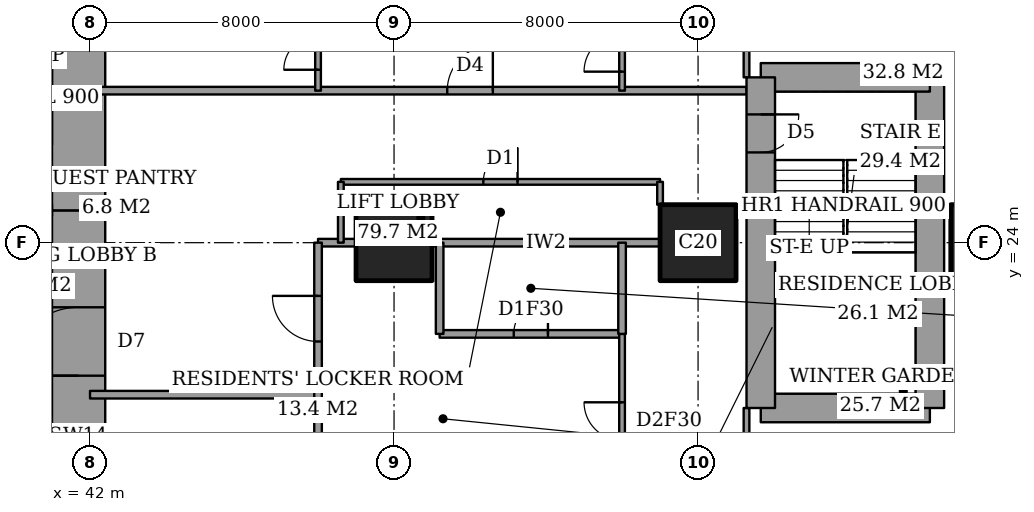
"""IFC4 building model, lengths in metres.
Left out: names, types, materials, properties, quantities, classifications, styles, units other than length and angle.
Written with IfcOpenShell. Run it as: python <this file> out.ifc"""

import sys

from ifc_helpers import new_model, si_unit, direction, frame, frame_2d, origin, origin_2d, place, context, subcontext, project, spatial, rectangle, extrude, element, fill, save


model = new_model("IFC4")
c1 = context("Model", 3, precision=1e-05, world=origin(), true_north=direction((0.0, 1.0)))
c2 = subcontext(c1, "Body", "Model", "MODEL_VIEW")
j1 = project(units=[si_unit("LENGTHUNIT", "METRE"), si_unit("PLANEANGLEUNIT", "RADIAN")], contexts=[c1])
p1 = place(None, origin())
s1 = spatial("IfcSite", under=j1, at=p1, CompositionType="ELEMENT")
p2 = place(p1, origin())
s2 = spatial("IfcBuilding", under=s1, at=p2, CompositionType="ELEMENT")
p3 = place(p2, frame((0.0, 0.0, 80.0)))
s3 = spatial("IfcBuildingStorey", under=s2, at=p3, CompositionType="ELEMENT", Elevation=80.0)
for number, where, z_axis, x_axis in (
    (1, (50.0, 24.0, 0.0), (0.0, 0.0, 1.0), (1.0, 0.0, 0.0)),
    (2, (58.0, 24.0, 0.0), (0.0, 0.0, 1.0), (1.0, 0.0, 0.0)),
    (3, (65.65, 24.0, 0.0), (0.0, 0.0, 1.0), (1.0, 0.0, 0.0)),
):
    element("IfcColumn", number, at=place(p3, frame(where, z_axis=z_axis, x_axis=x_axis)), inside=s3, PredefinedType="COLUMN", context=c2, shape_type="SweptSolid", body=[
        extrude(rectangle(XDim=2.0, YDim=2.0, at=origin_2d()), origin(), (0.0, 0.0, 1.0), 3.6),
    ])
p4 = place(p3, frame((41.7, 13.0, 0.0), z_axis=(0.0, 0.0, 1.0), x_axis=(0.0, 1.0, 0.0)))
e4 = element("IfcWall", 4, at=p4, inside=s3, PredefinedType="SHEAR", context=c2, shape_type="SweptSolid", body=[
    extrude(rectangle(XDim=11.85, YDim=1.4, at=frame_2d((5.925, 0.0))), origin(), (0.0, 0.0, 1.0), 3.6),
])
p5 = place(p4, frame((7.5, 0.0, 0.0)))
e5 = element("IfcOpeningElement", 5, at=p5, cuts=e4, PredefinedType="OPENING", context=c2, shape_type="SweptSolid", body=[
    extrude(rectangle(XDim=1.8, YDim=2.4, at=frame_2d((0.9, 1.2))), frame((0.0, 0.71, 0.0), z_axis=(0.0, -1.0, 0.0), x_axis=(1.0, 0.0, 0.0)), (0.0, 0.0, 1.0), 1.42),
])
p6 = place(p3, frame((41.7, 24.85, 0.0), z_axis=(0.0, 0.0, 1.0), x_axis=(0.0, 1.0, 0.0)))
e6 = element("IfcWall", 6, at=p6, inside=s3, PredefinedType="SHEAR", context=c2, shape_type="SweptSolid", body=[
    extrude(rectangle(XDim=10.15, YDim=1.4, at=frame_2d((5.075, 0.0))), origin(), (0.0, 0.0, 1.0), 3.6),
])
p7 = place(p3, frame((59.65, 19.65, 0.0), z_axis=(0.0, 0.0, 1.0), x_axis=(1.0, 0.0, 0.0)))
e7 = element("IfcWall", 7, at=p7, inside=s3, PredefinedType="SHEAR", context=c2, shape_type="SweptSolid", body=[
    extrude(rectangle(XDim=4.45, YDim=0.75, at=frame_2d((2.225, 0.0))), origin(), (0.0, 0.0, 1.0), 3.6),
])
p8 = place(p3, frame((64.1, 19.65, 0.0), z_axis=(0.0, 0.0, 1.0), x_axis=(0.0, 1.0, 0.0)))
e8 = element("IfcWall", 8, at=p8, inside=s3, PredefinedType="SHEAR", context=c2, shape_type="SweptSolid", body=[
    extrude(rectangle(XDim=8.7, YDim=0.75, at=frame_2d((4.35, 0.0))), origin(), (0.0, 0.0, 1.0), 3.6),
])
p9 = place(p3, frame((64.1, 28.35, 0.0), z_axis=(0.0, 0.0, 1.0), x_axis=(-1.0, 0.0, 0.0)))
e9 = element("IfcWall", 9, at=p9, inside=s3, PredefinedType="SHEAR", context=c2, shape_type="SweptSolid", body=[
    extrude(rectangle(XDim=4.45, YDim=0.75, at=frame_2d((2.225, 0.0))), origin(), (0.0, 0.0, 1.0), 3.6),
])
p10 = place(p3, frame((59.65, 28.35, 0.0), z_axis=(0.0, 0.0, 1.0), x_axis=(0.0, -1.0, 0.0)))
e10 = element("IfcWall", 10, at=p10, inside=s3, PredefinedType="SHEAR", context=c2, shape_type="SweptSolid", body=[
    extrude(rectangle(XDim=8.7, YDim=0.75, at=frame_2d((4.35, 0.0))), origin(), (0.0, 0.0, 1.0), 3.6),
])
p11 = place(p10, frame((0.975, 0.0, 0.0)))
e11 = element("IfcOpeningElement", 11, at=p11, cuts=e10, PredefinedType="OPENING", context=c2, shape_type="SweptSolid", body=[
    extrude(rectangle(XDim=1.0, YDim=2.1, at=frame_2d((0.5, 1.05))), frame((0.0, 0.385, 0.0), z_axis=(0.0, -1.0, 0.0), x_axis=(1.0, 0.0, 0.0)), (0.0, 0.0, 1.0), 0.77),
])
p12 = place(p3, frame((42.0, 20.0, 0.0), z_axis=(0.0, 0.0, 1.0), x_axis=(1.0, 0.0, 0.0)))
e12 = element("IfcWall", 12, at=p12, inside=s3, PredefinedType="PARTITIONING", context=c2, shape_type="SweptSolid", body=[
    extrude(rectangle(XDim=6.0, YDim=0.2, at=frame_2d((3.0, 0.0))), origin(), (0.0, 0.0, 1.0), 3.35),
])
p13 = place(p3, frame((51.2, 21.6, 0.0), z_axis=(0.0, 0.0, 1.0), x_axis=(1.0, 0.0, 0.0)))
e13 = element("IfcWall", 13, at=p13, inside=s3, PredefinedType="PARTITIONING", context=c2, shape_type="SweptSolid", body=[
    extrude(rectangle(XDim=4.8, YDim=0.2, at=frame_2d((2.4, 0.0))), origin(), (0.0, 0.0, 1.0), 3.35),
])
p14 = place(p13, frame((1.95, 0.0, 0.0)))
e14 = element("IfcOpeningElement", 14, at=p14, cuts=e13, PredefinedType="OPENING", context=c2, shape_type="SweptSolid", body=[
    extrude(rectangle(XDim=0.9, YDim=2.1, at=frame_2d((0.45, 1.05))), frame((0.0, 0.11, 0.0), z_axis=(0.0, -1.0, 0.0), x_axis=(1.0, 0.0, 0.0)), (0.0, 0.0, 1.0), 0.22),
])
p15 = place(p3, frame((48.0, 24.0, 0.0), z_axis=(0.0, 0.0, 1.0), x_axis=(1.0, 0.0, 0.0)))
e15 = element("IfcWall", 15, at=p15, inside=s3, PredefinedType="PARTITIONING", context=c2, shape_type="SweptSolid", body=[
    extrude(rectangle(XDim=1.0, YDim=0.2, at=frame_2d((0.5, 0.0))), origin(), (0.0, 0.0, 1.0), 3.35),
])
p16 = place(p3, frame((51.0, 24.0, 0.0), z_axis=(0.0, 0.0, 1.0), x_axis=(1.0, 0.0, 0.0)))
e16 = element("IfcWall", 16, at=p16, inside=s3, PredefinedType="PARTITIONING", context=c2, shape_type="SweptSolid", body=[
    extrude(rectangle(XDim=6.0, YDim=0.2, at=frame_2d((3.0, 0.0))), origin(), (0.0, 0.0, 1.0), 3.35),
])
p17 = place(p3, frame((48.6, 25.6, 0.0), z_axis=(0.0, 0.0, 1.0), x_axis=(1.0, 0.0, 0.0)))
e17 = element("IfcWall", 17, at=p17, inside=s3, PredefinedType="PARTITIONING", context=c2, shape_type="SweptSolid", body=[
    extrude(rectangle(XDim=8.4, YDim=0.15, at=frame_2d((4.2, 0.0))), origin(), (0.0, 0.0, 1.0), 3.35),
])
p18 = place(p17, frame((3.75, 0.0, 0.0)))
e18 = element("IfcOpeningElement", 18, at=p18, cuts=e17, PredefinedType="OPENING", context=c2, shape_type="SweptSolid", body=[
    extrude(rectangle(XDim=0.9, YDim=2.1, at=frame_2d((0.45, 1.05))), frame((0.0, 0.085, 0.0), z_axis=(0.0, -1.0, 0.0), x_axis=(1.0, 0.0, 0.0)), (0.0, 0.0, 1.0), 0.17),
])
p19 = place(p3, frame((42.0, 28.0, 0.0), z_axis=(0.0, 0.0, 1.0), x_axis=(1.0, 0.0, 0.0)))
e19 = element("IfcWall", 19, at=p19, inside=s3, PredefinedType="PARTITIONING", context=c2, shape_type="SweptSolid", body=[
    extrude(rectangle(XDim=17.275, YDim=0.2, at=frame_2d((8.637, 0.0))), origin(), (0.0, 0.0, 1.0), 3.35),
])
p20 = place(p19, frame((9.4, 0.0, 0.0)))
e20 = element("IfcOpeningElement", 20, at=p20, cuts=e19, PredefinedType="OPENING", context=c2, shape_type="SweptSolid", body=[
    extrude(rectangle(XDim=1.2, YDim=2.4, at=frame_2d((0.6, 1.2))), frame((0.0, 0.11, 0.0), z_axis=(0.0, -1.0, 0.0), x_axis=(1.0, 0.0, 0.0)), (0.0, 0.0, 1.0), 0.22),
])
p21 = place(p3, frame((48.0, 17.0, 0.0), z_axis=(0.0, 0.0, 1.0), x_axis=(0.0, 1.0, 0.0)))
e21 = element("IfcWall", 21, at=p21, inside=s3, PredefinedType="PARTITIONING", context=c2, shape_type="SweptSolid", body=[
    extrude(rectangle(XDim=7.0, YDim=0.2, at=frame_2d((3.5, 0.0))), origin(), (0.0, 0.0, 1.0), 3.35),
])
p22 = place(p21, frame((4.4, 0.0, 0.0)))
e22 = element("IfcOpeningElement", 22, at=p22, cuts=e21, PredefinedType="OPENING", context=c2, shape_type="SweptSolid", body=[
    extrude(rectangle(XDim=1.2, YDim=2.4, at=frame_2d((0.6, 1.2))), frame((0.0, 0.11, 0.0), z_axis=(0.0, -1.0, 0.0), x_axis=(1.0, 0.0, 0.0)), (0.0, 0.0, 1.0), 0.22),
])
p23 = place(p21, frame((1.05, 0.0, 0.0)))
e23 = element("IfcOpeningElement", 23, at=p23, cuts=e21, PredefinedType="OPENING", context=c2, shape_type="SweptSolid", body=[
    extrude(rectangle(XDim=0.9, YDim=2.1, at=frame_2d((0.45, 1.05))), frame((0.0, 0.11, 0.0), z_axis=(0.0, -1.0, 0.0), x_axis=(1.0, 0.0, 0.0)), (0.0, 0.0, 1.0), 0.22),
])
p24 = place(p3, frame((48.0, 28.0, 0.0), z_axis=(0.0, 0.0, 1.0), x_axis=(0.0, 1.0, 0.0)))
e24 = element("IfcWall", 24, at=p24, inside=s3, PredefinedType="PARTITIONING", context=c2, shape_type="SweptSolid", body=[
    extrude(rectangle(XDim=9.4, YDim=0.15, at=frame_2d((4.7, 0.0))), origin(), (0.0, 0.0, 1.0), 3.35),
])
p25 = place(p24, frame((0.55, 0.0, 0.0)))
e25 = element("IfcOpeningElement", 25, at=p25, cuts=e24, PredefinedType="OPENING", context=c2, shape_type="SweptSolid", body=[
    extrude(rectangle(XDim=0.9, YDim=2.1, at=frame_2d((0.45, 1.05))), frame((0.0, 0.085, 0.0), z_axis=(0.0, -1.0, 0.0), x_axis=(1.0, 0.0, 0.0)), (0.0, 0.0, 1.0), 0.17),
])
p26 = place(p3, frame((48.6, 24.0, 0.0), z_axis=(0.0, 0.0, 1.0), x_axis=(0.0, 1.0, 0.0)))
e26 = element("IfcWall", 26, at=p26, inside=s3, PredefinedType="PARTITIONING", context=c2, shape_type="SweptSolid", body=[
    extrude(rectangle(XDim=1.6, YDim=0.15, at=frame_2d((0.8, 0.0))), origin(), (0.0, 0.0, 1.0), 3.35),
])
for number, where, z_axis, x_axis in (
    (27, (51.2, 21.6, 0.0), (0.0, 0.0, 1.0), (0.0, 1.0, 0.0)),
    (28, (56.0, 21.6, 0.0), (0.0, 0.0, 1.0), (0.0, 1.0, 0.0)),
):
    element("IfcWall", number, at=place(p3, frame(where, z_axis=z_axis, x_axis=x_axis)), inside=s3, PredefinedType="PARTITIONING", context=c2, shape_type="SweptSolid", body=[
        extrude(rectangle(XDim=2.4, YDim=0.2, at=frame_2d((1.2, 0.0))), origin(), (0.0, 0.0, 1.0), 3.35),
    ])
p27 = place(p3, frame((56.0, 10.6, 0.0), z_axis=(0.0, 0.0, 1.0), x_axis=(0.0, 1.0, 0.0)))
e29 = element("IfcWall", 29, at=p27, inside=s3, PredefinedType="PARTITIONING", context=c2, shape_type="SweptSolid", body=[
    extrude(rectangle(XDim=11.0, YDim=0.15, at=frame_2d((5.5, 0.0))), origin(), (0.0, 0.0, 1.0), 3.35),
])
p28 = place(p27, frame((8.2, 0.0, 0.0)))
e30 = element("IfcOpeningElement", 30, at=p28, cuts=e29, PredefinedType="OPENING", context=c2, shape_type="SweptSolid", body=[
    extrude(rectangle(XDim=1.0, YDim=2.1, at=frame_2d((0.5, 1.05))), frame((0.0, 0.085, 0.0), z_axis=(0.0, -1.0, 0.0), x_axis=(1.0, 0.0, 0.0)), (0.0, 0.0, 1.0), 0.17),
])
p29 = place(p3, frame((56.0, 28.0, 0.0), z_axis=(0.0, 0.0, 1.0), x_axis=(0.0, 1.0, 0.0)))
e31 = element("IfcWall", 31, at=p29, inside=s3, PredefinedType="PARTITIONING", context=c2, shape_type="SweptSolid", body=[
    extrude(rectangle(XDim=9.4, YDim=0.15, at=frame_2d((4.7, 0.0))), origin(), (0.0, 0.0, 1.0), 3.35),
])
p30 = place(p29, frame((0.5, 0.0, 0.0)))
e32 = element("IfcOpeningElement", 32, at=p30, cuts=e31, PredefinedType="OPENING", context=c2, shape_type="SweptSolid", body=[
    extrude(rectangle(XDim=1.0, YDim=2.1, at=frame_2d((0.5, 1.05))), frame((0.0, 0.085, 0.0), z_axis=(0.0, -1.0, 0.0), x_axis=(1.0, 0.0, 0.0)), (0.0, 0.0, 1.0), 0.17),
])
p31 = place(p3, frame((57.0, 25.0, 0.0), z_axis=(0.0, 0.0, 1.0), x_axis=(0.0, 1.0, 0.0)))
e33 = element("IfcWall", 33, at=p31, inside=s3, PredefinedType="PARTITIONING", context=c2, shape_type="SweptSolid", body=[
    extrude(rectangle(XDim=0.6, YDim=0.15, at=frame_2d((0.3, 0.0))), origin(), (0.0, 0.0, 1.0), 3.35),
])
p32 = place(p3, frame((59.275, 17.2, 0.0), z_axis=(0.0, 0.0, 1.0), x_axis=(0.0, 1.0, 0.0)))
e34 = element("IfcWall", 34, at=p32, inside=s3, PredefinedType="PARTITIONING", context=c2, shape_type="SweptSolid", body=[
    extrude(rectangle(XDim=2.45, YDim=0.15, at=frame_2d((1.225, 0.0))), origin(), (0.0, 0.0, 1.0), 3.35),
])
p33 = place(p32, frame((0.538, 0.0, 0.0)))
e35 = element("IfcOpeningElement", 35, at=p33, cuts=e34, PredefinedType="OPENING", context=c2, shape_type="SweptSolid", body=[
    extrude(rectangle(XDim=1.0, YDim=2.1, at=frame_2d((0.5, 1.05))), frame((0.0, 0.085, 0.0), z_axis=(0.0, -1.0, 0.0), x_axis=(1.0, 0.0, 0.0)), (0.0, 0.0, 1.0), 0.17),
])
p34 = place(p3, frame((59.275, 28.35, 0.0), z_axis=(0.0, 0.0, 1.0), x_axis=(0.0, 1.0, 0.0)))
e36 = element("IfcWall", 36, at=p34, inside=s3, PredefinedType="PARTITIONING", context=c2, shape_type="SweptSolid", body=[
    extrude(rectangle(XDim=2.45, YDim=0.15, at=frame_2d((1.225, 0.0))), origin(), (0.0, 0.0, 1.0), 3.35),
])
p35 = place(p34, frame((0.913, 0.0, 0.0)))
e37 = element("IfcOpeningElement", 37, at=p35, cuts=e36, PredefinedType="OPENING", context=c2, shape_type="SweptSolid", body=[
    extrude(rectangle(XDim=1.0, YDim=2.1, at=frame_2d((0.5, 1.05))), frame((0.0, 0.085, 0.0), z_axis=(0.0, -1.0, 0.0), x_axis=(1.0, 0.0, 0.0)), (0.0, 0.0, 1.0), 0.17),
])
p36 = place(p28, origin())
e38 = element("IfcDoor", 38, at=p36, inside=s3, OperationType="SINGLE_SWING_LEFT", PredefinedType="DOOR", context=c2, shape_type="SweptSolid", body=[
    extrude(rectangle(XDim=1.0, YDim=2.1, at=frame_2d((0.5, 1.05))), frame((0.0, 0.025, 0.0), z_axis=(0.0, -1.0, 0.0), x_axis=(1.0, 0.0, 0.0)), (0.0, 0.0, 1.0), 0.05),
])
fill(e30, e38)
p37 = place(p14, origin())
e39 = element("IfcDoor", 39, at=p37, inside=s3, OperationType="SINGLE_SWING_LEFT", PredefinedType="DOOR", context=c2, shape_type="SweptSolid", body=[
    extrude(rectangle(XDim=0.9, YDim=2.1, at=frame_2d((0.45, 1.05))), frame((0.0, 0.025, 0.0), z_axis=(0.0, -1.0, 0.0), x_axis=(1.0, 0.0, 0.0)), (0.0, 0.0, 1.0), 0.05),
])
fill(e14, e39)
p38 = place(p22, origin())
e40 = element("IfcDoor", 40, at=p38, inside=s3, OperationType="SINGLE_SWING_LEFT", PredefinedType="DOOR", context=c2, shape_type="SweptSolid", body=[
    extrude(rectangle(XDim=1.2, YDim=2.4, at=frame_2d((0.6, 1.2))), frame((0.0, 0.025, 0.0), z_axis=(0.0, -1.0, 0.0), x_axis=(1.0, 0.0, 0.0)), (0.0, 0.0, 1.0), 0.05),
])
fill(e22, e40)
p39 = place(p30, origin())
e41 = element("IfcDoor", 41, at=p39, inside=s3, OperationType="SINGLE_SWING_RIGHT", PredefinedType="DOOR", context=c2, shape_type="SweptSolid", body=[
    extrude(rectangle(XDim=1.0, YDim=2.1, at=frame_2d((0.5, 1.05))), frame((0.0, 0.025, 0.0), z_axis=(0.0, -1.0, 0.0), x_axis=(1.0, 0.0, 0.0)), (0.0, 0.0, 1.0), 0.05),
])
fill(e32, e41)
p40 = place(p20, origin())
e42 = element("IfcDoor", 42, at=p40, inside=s3, OperationType="SINGLE_SWING_LEFT", PredefinedType="DOOR", context=c2, shape_type="SweptSolid", body=[
    extrude(rectangle(XDim=1.2, YDim=2.4, at=frame_2d((0.6, 1.2))), frame((0.0, 0.025, 0.0), z_axis=(0.0, -1.0, 0.0), x_axis=(1.0, 0.0, 0.0)), (0.0, 0.0, 1.0), 0.05),
])
fill(e20, e42)
p41 = place(p25, origin())
e43 = element("IfcDoor", 43, at=p41, inside=s3, OperationType="SINGLE_SWING_RIGHT", PredefinedType="DOOR", context=c2, shape_type="SweptSolid", body=[
    extrude(rectangle(XDim=0.9, YDim=2.1, at=frame_2d((0.45, 1.05))), frame((0.0, 0.025, 0.0), z_axis=(0.0, -1.0, 0.0), x_axis=(1.0, 0.0, 0.0)), (0.0, 0.0, 1.0), 0.05),
])
fill(e25, e43)
p42 = place(p18, origin())
e44 = element("IfcDoor", 44, at=p42, inside=s3, OperationType="SINGLE_SWING_LEFT", PredefinedType="DOOR", context=c2, shape_type="SweptSolid", body=[
    extrude(rectangle(XDim=0.9, YDim=2.1, at=frame_2d((0.45, 1.05))), frame((0.0, 0.025, 0.0), z_axis=(0.0, -1.0, 0.0), x_axis=(1.0, 0.0, 0.0)), (0.0, 0.0, 1.0), 0.05),
])
fill(e18, e44)
p43 = place(p5, origin())
e45 = element("IfcDoor", 45, at=p43, inside=s3, OperationType="DOUBLE_DOOR_DOUBLE_SWING", PredefinedType="DOOR", context=c2, shape_type="SweptSolid", body=[
    extrude(rectangle(XDim=1.8, YDim=2.4, at=frame_2d((0.9, 1.2))), frame((0.0, 0.025, 0.0), z_axis=(0.0, -1.0, 0.0), x_axis=(1.0, 0.0, 0.0)), (0.0, 0.0, 1.0), 0.05),
])
fill(e5, e45)
p44 = place(p11, origin())
e46 = element("IfcDoor", 46, at=p44, inside=s3, OperationType="SINGLE_SWING_RIGHT", PredefinedType="DOOR", context=c2, shape_type="SweptSolid", body=[
    extrude(rectangle(XDim=1.0, YDim=2.1, at=frame_2d((0.5, 1.05))), frame((0.0, 0.025, 0.0), z_axis=(0.0, -1.0, 0.0), x_axis=(1.0, 0.0, 0.0)), (0.0, 0.0, 1.0), 0.05),
])
fill(e11, e46)
save(model, sys.argv[1])
